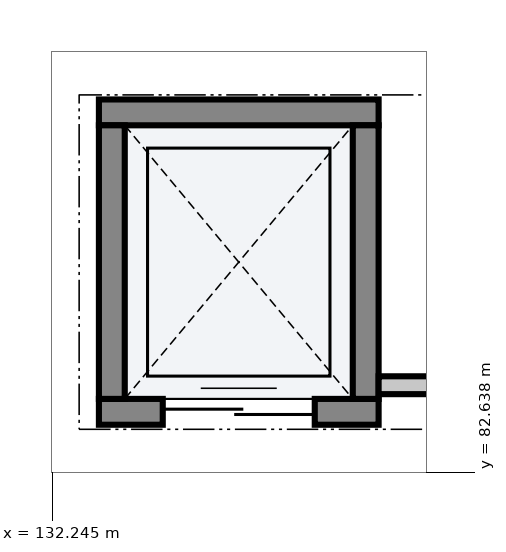
"""IFC4 building model, lengths in metres.
Left out: names, types, materials, properties, quantities, classifications, styles, units other than length and angle.
Written with IfcOpenShell. Run it as: python <this file> out.ifc"""

import sys

from ifc_helpers import new_model, si_unit, direction, frame, frame_2d, origin, place, context, subcontext, project, spatial, rectangle, extrude, element, fill, save


model = new_model("IFC4")
c1 = context("Model", 3, precision=1e-05, world=origin(), true_north=direction((0.0, 1.0)))
c2 = subcontext(c1, "Body", "Model", "MODEL_VIEW")
j1 = project(units=[si_unit("LENGTHUNIT", "METRE"), si_unit("PLANEANGLEUNIT", "RADIAN")], contexts=[c1])
p1 = place(None, origin())
s1 = spatial("IfcSite", under=j1, at=p1, CompositionType="ELEMENT")
p2 = place(p1, origin())
s2 = spatial("IfcBuilding", under=s1, at=p2, CompositionType="ELEMENT")
p3 = place(p2, frame((0.0, 0.0, 10.2)))
s3 = spatial("IfcBuildingStorey", under=s2, at=p3, CompositionType="ELEMENT", Elevation=10.2)
p4 = place(p3, frame((132.86, 83.43, 0.0), z_axis=(0.0, 0.0, 1.0), x_axis=(1.0, 0.0, 0.0)))
e1 = element("IfcWall", 1, at=p4, inside=s3, PredefinedType="SHEAR", context=c2, shape_type="SweptSolid", body=[
    extrude(rectangle(XDim=3.68, YDim=0.34, at=frame_2d((1.84, 0.0))), origin(), (0.0, 0.0, 1.0), 4.515),
])
p5 = place(p4, frame((0.84, 0.0, 0.0)))
e2 = element("IfcOpeningElement", 2, at=p5, cuts=e1, PredefinedType="OPENING", context=c2, shape_type="SweptSolid", body=[
    extrude(rectangle(XDim=2.0, YDim=2.4, at=frame_2d((1.0, 1.2))), frame((0.0, 0.182, 0.0), z_axis=(0.0, -1.0, 0.0), x_axis=(1.0, 0.0, 0.0)), (0.0, 0.0, 1.0), 0.364),
])
p6 = place(p3, frame((132.86, 87.37, 0.0), z_axis=(0.0, 0.0, 1.0), x_axis=(1.0, 0.0, 0.0)))
e3 = element("IfcWall", 3, at=p6, inside=s3, PredefinedType="SHEAR", context=c2, shape_type="SweptSolid", body=[
    extrude(rectangle(XDim=3.68, YDim=0.34, at=frame_2d((1.84, 0.0))), origin(), (0.0, 0.0, 1.0), 4.515),
])
for number, where, z_axis, x_axis in (
    (4, (133.03, 83.6, 0.0), (0.0, 0.0, 1.0), (0.0, 1.0, 0.0)),
    (5, (136.37, 83.6, 0.0), (0.0, 0.0, 1.0), (0.0, 1.0, 0.0)),
):
    element("IfcWall", number, at=place(p3, frame(where, z_axis=z_axis, x_axis=x_axis)), inside=s3, PredefinedType="SHEAR", context=c2, shape_type="SweptSolid", body=[
        extrude(rectangle(XDim=3.6, YDim=0.34, at=frame_2d((1.8, 0.0))), origin(), (0.0, 0.0, 1.0), 4.515),
    ])
p7 = place(p3, frame((141.86, 83.78, 0.0), z_axis=(0.0, 0.0, 1.0), x_axis=(-1.0, 0.0, 0.0)))
e6 = element("IfcWall", 6, at=p7, inside=s3, PredefinedType="PARTITIONING", context=c2, shape_type="SweptSolid", body=[
    extrude(rectangle(XDim=5.32, YDim=0.235, at=frame_2d((2.66, 0.0))), origin(), (0.0, 0.0, 1.0), 3.455),
])
p8 = place(p5, origin())
e7 = element("IfcDoor", 7, at=p8, inside=s3, OperationType="DOUBLE_DOOR_SLIDING", PredefinedType="DOOR", context=c2, shape_type="SweptSolid", body=[
    extrude(rectangle(XDim=2.0, YDim=2.4, at=frame_2d((1.0, 1.2))), frame((0.0, 0.025, 0.0), z_axis=(0.0, -1.0, 0.0), x_axis=(1.0, 0.0, 0.0)), (0.0, 0.0, 1.0), 0.05),
])
fill(e2, e7)
save(model, sys.argv[1])
